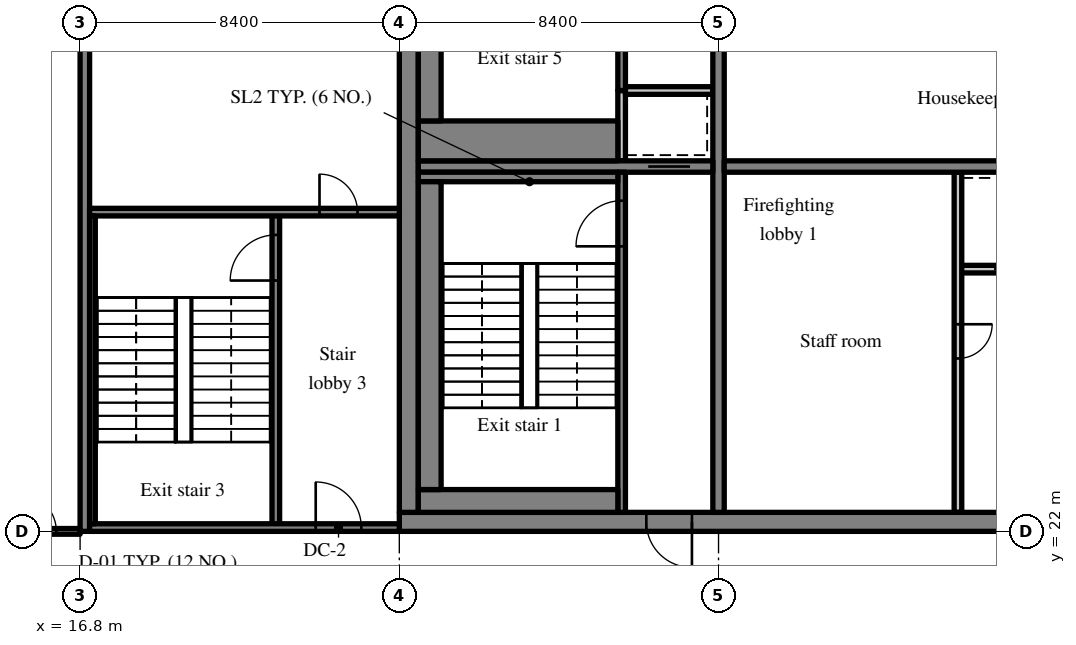
"""IFC4 building model, lengths in metres.
Left out: names, types, materials, properties, quantities, classifications, styles, units other than length and angle.
Written with IfcOpenShell. Run it as: python <this file> out.ifc"""

import sys

from ifc_helpers import new_model, si_unit, direction, frame, frame_2d, origin, place, context, subcontext, project, spatial, rectangle, extrude, source, transform, mapped, element, fill, save


model = new_model("IFC4")
c1 = context("Model", 3, precision=1e-05, world=origin(), true_north=direction((0.0, 1.0)))
c2 = subcontext(c1, "Body", "Model", "MODEL_VIEW")
j1 = project(units=[si_unit("LENGTHUNIT", "METRE"), si_unit("PLANEANGLEUNIT", "RADIAN")], contexts=[c1])
p1 = place(None, origin())
s1 = spatial("IfcSite", under=j1, at=p1, CompositionType="ELEMENT")
p2 = place(p1, origin())
s2 = spatial("IfcBuilding", under=s1, at=p2, CompositionType="ELEMENT")
p3 = place(p2, frame((0.0, 0.0, 277.7)))
s3 = spatial("IfcBuildingStorey", under=s2, at=p3, CompositionType="ELEMENT", Elevation=277.7)
m1 = source(origin(), c2, "Body", "SweptSolid", [
    extrude(rectangle(XDim=50.4, YDim=0.5, at=frame_2d((25.2, 0.0))), origin(), (0.0, 0.0, 1.0), 3.72),
])
p4 = place(p3, frame((25.2, 22.25, 0.0), z_axis=(0.0, 0.0, 1.0), x_axis=(1.0, 0.0, 0.0)))
e1 = element("IfcWall", 1, at=p4, inside=s3, PredefinedType="SHEAR", context=c2, shape_type="MappedRepresentation", body=[
    mapped(m1, transform((0.0, 0.0, 0.0), scale=1.0)),
])
m2 = source(origin(), c2, "Body", "SweptSolid", [
    extrude(rectangle(XDim=1.8, YDim=2.1, at=frame_2d((0.9, 1.05))), frame((0.0, 0.26, 0.0), z_axis=(0.0, -1.0, 0.0), x_axis=(1.0, 0.0, 0.0)), (0.0, 0.0, 1.0), 0.52),
])
p5 = place(p4, frame((15.9, 0.0, 0.0)))
e2 = element("IfcOpeningElement", 2, at=p5, cuts=e1, PredefinedType="OPENING", context=c2, shape_type="MappedRepresentation", body=[
    mapped(m2, transform((0.0, 0.0, 0.0), scale=1.0)),
])
m3 = source(origin(), c2, "Body", "SweptSolid", [
    extrude(rectangle(XDim=0.9, YDim=2.1, at=frame_2d((0.45, 1.05))), frame((0.0, 0.26, 0.0), z_axis=(0.0, -1.0, 0.0), x_axis=(1.0, 0.0, 0.0)), (0.0, 0.0, 1.0), 0.52),
])
p6 = place(p4, frame((21.525, 0.0, 0.0)))
e3 = element("IfcOpeningElement", 3, at=p6, cuts=e1, PredefinedType="OPENING", context=c2, shape_type="MappedRepresentation", body=[
    mapped(m3, transform((0.0, 0.0, 0.0), scale=1.0)),
])
p7 = place(p4, frame((32.7, 0.0, 0.0)))
e4 = element("IfcOpeningElement", 4, at=p7, cuts=e1, PredefinedType="OPENING", context=c2, shape_type="MappedRepresentation", body=[
    mapped(m2, transform((0.0, 0.0, 0.0), scale=1.0)),
])
m4 = source(origin(), c2, "Body", "SweptSolid", [
    extrude(rectangle(XDim=1.2, YDim=2.1, at=frame_2d((0.6, 1.05))), frame((0.0, 0.26, 0.0), z_axis=(0.0, -1.0, 0.0), x_axis=(1.0, 0.0, 0.0)), (0.0, 0.0, 1.0), 0.52),
])
p8 = place(p4, frame((6.5, 0.0, 0.0)))
e5 = element("IfcOpeningElement", 5, at=p8, cuts=e1, PredefinedType="OPENING", context=c2, shape_type="MappedRepresentation", body=[
    mapped(m4, transform((0.0, 0.0, 0.0), scale=1.0)),
])
p9 = place(p4, frame((47.975, 0.0, 0.0)))
e6 = element("IfcOpeningElement", 6, at=p9, cuts=e1, PredefinedType="OPENING", context=c2, shape_type="MappedRepresentation", body=[
    mapped(m4, transform((0.0, 0.0, 0.0), scale=1.0)),
])
m5 = source(origin(), c2, "Body", "SweptSolid", [
    extrude(rectangle(XDim=19.0, YDim=0.5, at=frame_2d((9.5, 0.0))), origin(), (0.0, 0.0, 1.0), 3.72),
])
p10 = place(p3, frame((25.45, 22.5, 0.0), z_axis=(0.0, 0.0, 1.0), x_axis=(0.0, 1.0, 0.0)))
e7 = element("IfcWall", 7, at=p10, inside=s3, PredefinedType="SHEAR", context=c2, shape_type="MappedRepresentation", body=[
    mapped(m5, transform((0.0, 0.0, 0.0), scale=1.0)),
])
m6 = source(origin(), c2, "Body", "SweptSolid", [
    extrude(rectangle(XDim=19.0, YDim=0.3, at=frame_2d((9.5, 0.0))), origin(), (0.0, 0.0, 1.0), 3.72),
])
p11 = place(p3, frame((33.6, 22.5, 0.0), z_axis=(0.0, 0.0, 1.0), x_axis=(0.0, 1.0, 0.0)))
e8 = element("IfcWall", 8, at=p11, inside=s3, PredefinedType="SHEAR", context=c2, shape_type="MappedRepresentation", body=[
    mapped(m6, transform((0.0, 0.0, 0.0), scale=1.0)),
])
m7 = source(origin(), c2, "Body", "SweptSolid", [
    extrude(rectangle(XDim=1.1, YDim=2.1, at=frame_2d((0.55, 1.05))), frame((0.0, 0.16, 0.0), z_axis=(0.0, -1.0, 0.0), x_axis=(1.0, 0.0, 0.0)), (0.0, 0.0, 1.0), 0.32),
])
p12 = place(p11, frame((12.95, 0.0, 0.0)))
e9 = element("IfcOpeningElement", 9, at=p12, cuts=e8, PredefinedType="OPENING", context=c2, shape_type="MappedRepresentation", body=[
    mapped(m7, transform((0.0, 0.0, 0.0), scale=1.0)),
])
m8 = source(origin(), c2, "Body", "SweptSolid", [
    extrude(rectangle(XDim=7.75, YDim=0.3, at=frame_2d((3.875, 0.0))), origin(), (0.0, 0.0, 1.0), 3.72),
])
p13 = place(p3, frame((25.7, 31.6, 0.0), z_axis=(0.0, 0.0, 1.0), x_axis=(1.0, 0.0, 0.0)))
e10 = element("IfcWall", 10, at=p13, inside=s3, PredefinedType="SHEAR", context=c2, shape_type="MappedRepresentation", body=[
    mapped(m8, transform((0.0, 0.0, 0.0), scale=1.0)),
])
p14 = place(p13, frame((6.05, 0.0, 0.0)))
e11 = element("IfcOpeningElement", 11, at=p14, cuts=e10, PredefinedType="OPENING", context=c2, shape_type="MappedRepresentation", body=[
    mapped(m7, transform((0.0, 0.0, 0.0), scale=1.0)),
])
m9 = source(origin(), c2, "Body", "SweptSolid", [
    extrude(rectangle(XDim=16.5, YDim=0.3, at=frame_2d((8.25, 0.0))), origin(), (0.0, 0.0, 1.0), 3.72),
])
p15 = place(p3, frame((33.75, 31.6, 0.0), z_axis=(0.0, 0.0, 1.0), x_axis=(1.0, 0.0, 0.0)))
e12 = element("IfcWall", 12, at=p15, inside=s3, PredefinedType="SHEAR", context=c2, shape_type="MappedRepresentation", body=[
    mapped(m9, transform((0.0, 0.0, 0.0), scale=1.0)),
])
m10 = source(origin(), c2, "Body", "SweptSolid", [
    extrude(rectangle(XDim=1.0, YDim=2.1, at=frame_2d((0.5, 1.05))), frame((0.0, 0.16, 0.0), z_axis=(0.0, -1.0, 0.0), x_axis=(1.0, 0.0, 0.0)), (0.0, 0.0, 1.0), 0.32),
])
p16 = place(p15, frame((14.875, 0.0, 0.0)))
e13 = element("IfcOpeningElement", 13, at=p16, cuts=e12, PredefinedType="OPENING", context=c2, shape_type="MappedRepresentation", body=[
    mapped(m10, transform((0.0, 0.0, 0.0), scale=1.0)),
])
m11 = source(origin(), c2, "Body", "SweptSolid", [
    extrude(rectangle(XDim=18.4, YDim=0.25, at=frame_2d((9.2, 0.0))), origin(), (0.0, 0.0, 1.0), 3.72),
])
p17 = place(p3, frame((16.925, 22.0, 0.0), z_axis=(0.0, 0.0, 1.0), x_axis=(0.0, 1.0, 0.0)))
e14 = element("IfcWall", 14, at=p17, inside=s3, PredefinedType="SHEAR", context=c2, shape_type="MappedRepresentation", body=[
    mapped(m11, transform((0.0, 0.0, 0.0), scale=1.0)),
])
m12 = source(origin(), c2, "Body", "SweptSolid", [
    extrude(rectangle(XDim=6.0, YDim=0.2, at=frame_2d((3.0, 0.0))), origin(), (0.0, 0.0, 1.0), 3.72),
])
p18 = place(p3, frame((39.9, 28.9, 0.0), z_axis=(0.0, 0.0, 1.0), x_axis=(1.0, 0.0, 0.0)))
e15 = element("IfcWall", 15, at=p18, inside=s3, PredefinedType="SOLIDWALL", context=c2, shape_type="MappedRepresentation", body=[
    mapped(m12, transform((0.0, 0.0, 0.0), scale=1.0)),
])
m13 = source(origin(), c2, "Body", "SweptSolid", [
    extrude(rectangle(XDim=1.1, YDim=2.1, at=frame_2d((0.55, 1.05))), frame((0.0, 0.11, 0.0), z_axis=(0.0, -1.0, 0.0), x_axis=(1.0, 0.0, 0.0)), (0.0, 0.0, 1.0), 0.22),
])
p19 = place(p18, frame((0.95, 0.0, 0.0)))
e16 = element("IfcOpeningElement", 16, at=p19, cuts=e15, PredefinedType="OPENING", context=c2, shape_type="MappedRepresentation", body=[
    mapped(m13, transform((0.0, 0.0, 0.0), scale=1.0)),
])
p20 = place(p18, frame((3.95, 0.0, 0.0)))
e17 = element("IfcOpeningElement", 17, at=p20, cuts=e15, PredefinedType="OPENING", context=c2, shape_type="MappedRepresentation", body=[
    mapped(m13, transform((0.0, 0.0, 0.0), scale=1.0)),
])
m14 = source(origin(), c2, "Body", "SweptSolid", [
    extrude(rectangle(XDim=8.95, YDim=0.2, at=frame_2d((4.475, 0.0))), origin(), (0.0, 0.0, 1.0), 3.72),
])
p21 = place(p3, frame((39.9, 22.5, 0.0), z_axis=(0.0, 0.0, 1.0), x_axis=(0.0, 1.0, 0.0)))
e18 = element("IfcWall", 18, at=p21, inside=s3, PredefinedType="PARTITIONING", context=c2, shape_type="MappedRepresentation", body=[
    mapped(m14, transform((0.0, 0.0, 0.0), scale=1.0)),
])
m15 = source(origin(), c2, "Body", "SweptSolid", [
    extrude(rectangle(XDim=0.9, YDim=2.1, at=frame_2d((0.45, 1.05))), frame((0.0, 0.11, 0.0), z_axis=(0.0, -1.0, 0.0), x_axis=(1.0, 0.0, 0.0)), (0.0, 0.0, 1.0), 0.22),
])
p22 = place(p21, frame((4.05, 0.0, 0.0)))
e19 = element("IfcOpeningElement", 19, at=p22, cuts=e18, PredefinedType="OPENING", context=c2, shape_type="MappedRepresentation", body=[
    mapped(m15, transform((0.0, 0.0, 0.0), scale=1.0)),
])
m16 = source(origin(), c2, "Body", "SweptSolid", [
    extrude(rectangle(XDim=8.95, YDim=0.2, at=frame_2d((4.475, 0.0))), origin(), (0.0, 0.0, 1.0), 3.72),
])
p23 = place(p3, frame((31.05, 22.5, 0.0), z_axis=(0.0, 0.0, 1.0), x_axis=(0.0, 1.0, 0.0)))
e20 = element("IfcWall", 20, at=p23, inside=s3, PredefinedType="SOLIDWALL", context=c2, shape_type="MappedRepresentation", body=[
    mapped(m16, transform((0.0, 0.0, 0.0), scale=1.0)),
])
m17 = source(origin(), c2, "Body", "SweptSolid", [
    extrude(rectangle(XDim=1.2, YDim=2.1, at=frame_2d((0.6, 1.05))), frame((0.0, 0.11, 0.0), z_axis=(0.0, -1.0, 0.0), x_axis=(1.0, 0.0, 0.0)), (0.0, 0.0, 1.0), 0.22),
])
p24 = place(p23, frame((7.0, 0.0, 0.0)))
e21 = element("IfcOpeningElement", 21, at=p24, cuts=e20, PredefinedType="OPENING", context=c2, shape_type="MappedRepresentation", body=[
    mapped(m17, transform((0.0, 0.0, 0.0), scale=1.0)),
])
m18 = source(origin(), c2, "Body", "SweptSolid", [
    extrude(rectangle(XDim=1.85, YDim=0.2, at=frame_2d((0.925, 0.0))), origin(), (0.0, 0.0, 1.0), 3.72),
])
p25 = place(p3, frame((31.05, 31.75, 0.0), z_axis=(0.0, 0.0, 1.0), x_axis=(0.0, 1.0, 0.0)))
e22 = element("IfcWall", 22, at=p25, inside=s3, PredefinedType="SOLIDWALL", context=c2, shape_type="MappedRepresentation", body=[
    mapped(m18, transform((0.0, 0.0, 0.0), scale=1.0)),
])
m19 = source(origin(), c2, "Body", "SweptSolid", [
    extrude(rectangle(XDim=2.3, YDim=0.2, at=frame_2d((1.15, 0.0))), origin(), (0.0, 0.0, 1.0), 3.72),
])
p26 = place(p3, frame((31.15, 33.6, 0.0), z_axis=(0.0, 0.0, 1.0), x_axis=(1.0, 0.0, 0.0)))
e23 = element("IfcWall", 23, at=p26, inside=s3, PredefinedType="SOLIDWALL", context=c2, shape_type="MappedRepresentation", body=[
    mapped(m19, transform((0.0, 0.0, 0.0), scale=1.0)),
])
m20 = source(origin(), c2, "Body", "SweptSolid", [
    extrude(rectangle(XDim=7.9, YDim=0.2, at=frame_2d((3.95, 0.0))), origin(), (0.0, 0.0, 1.0), 3.72),
])
p27 = place(p3, frame((31.05, 33.6, 0.0), z_axis=(0.0, 0.0, 1.0), x_axis=(0.0, 1.0, 0.0)))
e24 = element("IfcWall", 24, at=p27, inside=s3, PredefinedType="SOLIDWALL", context=c2, shape_type="MappedRepresentation", body=[
    mapped(m20, transform((0.0, 0.0, 0.0), scale=1.0)),
])
m21 = source(origin(), c2, "Body", "SweptSolid", [
    extrude(rectangle(XDim=1.8, YDim=2.1, at=frame_2d((0.9, 1.05))), frame((0.0, 0.11, 0.0), z_axis=(0.0, -1.0, 0.0), x_axis=(1.0, 0.0, 0.0)), (0.0, 0.0, 1.0), 0.22),
])
p28 = place(p27, frame((5.3, 0.0, 0.0)))
e25 = element("IfcOpeningElement", 25, at=p28, cuts=e24, PredefinedType="OPENING", context=c2, shape_type="MappedRepresentation", body=[
    mapped(m21, transform((0.0, 0.0, 0.0), scale=1.0)),
])
m22 = source(origin(), c2, "Body", "SweptSolid", [
    extrude(rectangle(XDim=8.3, YDim=0.2, at=frame_2d((4.15, 0.0))), origin(), (0.0, 0.0, 1.0), 3.72),
])
p29 = place(p3, frame((21.95, 22.1, 0.0), z_axis=(0.0, 0.0, 1.0), x_axis=(0.0, 1.0, 0.0)))
e26 = element("IfcWall", 26, at=p29, inside=s3, PredefinedType="SOLIDWALL", context=c2, shape_type="MappedRepresentation", body=[
    mapped(m22, transform((0.0, 0.0, 0.0), scale=1.0)),
])
p30 = place(p29, frame((6.5, 0.0, 0.0)))
e27 = element("IfcOpeningElement", 27, at=p30, cuts=e26, PredefinedType="OPENING", context=c2, shape_type="MappedRepresentation", body=[
    mapped(m17, transform((0.0, 0.0, 0.0), scale=1.0)),
])
m23 = source(origin(), c2, "Body", "SweptSolid", [
    extrude(rectangle(XDim=8.15, YDim=0.2, at=frame_2d((4.075, 0.0))), origin(), (0.0, 0.0, 1.0), 3.72),
])
p31 = place(p3, frame((17.05, 22.1, 0.0), z_axis=(0.0, 0.0, 1.0), x_axis=(1.0, 0.0, 0.0)))
e28 = element("IfcWall", 28, at=p31, inside=s3, PredefinedType="SOLIDWALL", context=c2, shape_type="MappedRepresentation", body=[
    mapped(m23, transform((0.0, 0.0, 0.0), scale=1.0)),
])
p32 = place(p31, frame((5.95, 0.0, 0.0)))
e29 = element("IfcOpeningElement", 29, at=p32, cuts=e28, PredefinedType="OPENING", context=c2, shape_type="MappedRepresentation", body=[
    mapped(m17, transform((0.0, 0.0, 0.0), scale=1.0)),
])
p33 = place(p3, frame((17.05, 30.4, 0.0), z_axis=(0.0, 0.0, 1.0), x_axis=(1.0, 0.0, 0.0)))
e30 = element("IfcWall", 30, at=p33, inside=s3, PredefinedType="SOLIDWALL", context=c2, shape_type="MappedRepresentation", body=[
    mapped(m23, transform((0.0, 0.0, 0.0), scale=1.0)),
])
m24 = source(origin(), c2, "Body", "SweptSolid", [
    extrude(rectangle(XDim=1.0, YDim=2.1, at=frame_2d((0.5, 1.05))), frame((0.0, 0.11, 0.0), z_axis=(0.0, -1.0, 0.0), x_axis=(1.0, 0.0, 0.0)), (0.0, 0.0, 1.0), 0.22),
])
p34 = place(p33, frame((6.05, 0.0, 0.0)))
e31 = element("IfcOpeningElement", 31, at=p34, cuts=e30, PredefinedType="OPENING", context=c2, shape_type="MappedRepresentation", body=[
    mapped(m24, transform((0.0, 0.0, 0.0), scale=1.0)),
])
m25 = source(origin(), c2, "Body", "SweptSolid", [
    extrude(rectangle(XDim=5.25, YDim=0.6, at=frame_2d((2.625, 0.0))), origin(), (0.0, 0.0, 1.0), 3.72),
])
p35 = place(p3, frame((25.7, 22.8, 0.0), z_axis=(0.0, 0.0, 1.0), x_axis=(1.0, 0.0, 0.0)))
e32 = element("IfcWall", 32, at=p35, inside=s3, PredefinedType="SOLIDWALL", context=c2, shape_type="MappedRepresentation", body=[
    mapped(m25, transform((0.0, 0.0, 0.0), scale=1.0)),
])
m26 = source(origin(), c2, "Body", "SweptSolid", [
    extrude(rectangle(XDim=5.25, YDim=0.25, at=frame_2d((2.625, 0.0))), origin(), (0.0, 0.0, 1.0), 3.72),
])
p36 = place(p3, frame((25.7, 31.325, 0.0), z_axis=(0.0, 0.0, 1.0), x_axis=(1.0, 0.0, 0.0)))
e33 = element("IfcWall", 33, at=p36, inside=s3, PredefinedType="SOLIDWALL", context=c2, shape_type="MappedRepresentation", body=[
    mapped(m26, transform((0.0, 0.0, 0.0), scale=1.0)),
])
m27 = source(origin(), c2, "Body", "SweptSolid", [
    extrude(rectangle(XDim=8.1, YDim=0.6, at=frame_2d((4.05, 0.0))), origin(), (0.0, 0.0, 1.0), 3.72),
])
p37 = place(p3, frame((26.0, 23.1, 0.0), z_axis=(0.0, 0.0, 1.0), x_axis=(0.0, 1.0, 0.0)))
e34 = element("IfcWall", 34, at=p37, inside=s3, PredefinedType="SOLIDWALL", context=c2, shape_type="MappedRepresentation", body=[
    mapped(m27, transform((0.0, 0.0, 0.0), scale=1.0)),
])
m28 = source(origin(), c2, "Body", "SweptSolid", [
    extrude(rectangle(XDim=8.1, YDim=0.15, at=frame_2d((4.05, 0.0))), origin(), (0.0, 0.0, 1.0), 3.72),
])
p38 = place(p3, frame((17.125, 22.2, 0.0), z_axis=(0.0, 0.0, 1.0), x_axis=(0.0, 1.0, 0.0)))
e35 = element("IfcWall", 35, at=p38, inside=s3, PredefinedType="SOLIDWALL", context=c2, shape_type="MappedRepresentation", body=[
    mapped(m28, transform((0.0, 0.0, 0.0), scale=1.0)),
])
m29 = source(origin(), c2, "Body", "SweptSolid", [
    extrude(rectangle(XDim=5.25, YDim=1.05, at=frame_2d((2.625, 0.0))), origin(), (0.0, 0.0, 1.0), 3.72),
])
p39 = place(p3, frame((25.7, 32.275, 0.0), z_axis=(0.0, 0.0, 1.0), x_axis=(1.0, 0.0, 0.0)))
e36 = element("IfcWall", 36, at=p39, inside=s3, PredefinedType="SOLIDWALL", context=c2, shape_type="MappedRepresentation", body=[
    mapped(m29, transform((0.0, 0.0, 0.0), scale=1.0)),
])
p40 = place(p3, frame((26.0, 32.8, 0.0), z_axis=(0.0, 0.0, 1.0), x_axis=(0.0, 1.0, 0.0)))
e37 = element("IfcWall", 37, at=p40, inside=s3, PredefinedType="SOLIDWALL", context=c2, shape_type="MappedRepresentation", body=[
    mapped(m27, transform((0.0, 0.0, 0.0), scale=1.0)),
])
m30 = source(origin(), c2, "Body", "SweptSolid", [
    extrude(rectangle(XDim=1.9, YDim=0.15, at=frame_2d((0.95, 0.0))), origin(), (0.0, 0.0, 1.0), 3.02),
])
p41 = place(p3, frame((14.9, 22.0, 0.0), z_axis=(0.0, 0.0, 1.0), x_axis=(1.0, 0.0, 0.0)))
e38 = element("IfcWall", 38, at=p41, inside=s3, PredefinedType="PARTITIONING", context=c2, shape_type="MappedRepresentation", body=[
    mapped(m30, transform((0.0, 0.0, 0.0), scale=1.0)),
])
m31 = source(origin(), c2, "Body", "SweptSolid", [
    extrude(rectangle(XDim=1.0, YDim=2.1, at=frame_2d((0.5, 1.05))), frame((0.0, 0.085, 0.0), z_axis=(0.0, -1.0, 0.0), x_axis=(1.0, 0.0, 0.0)), (0.0, 0.0, 1.0), 0.17),
])
p42 = place(p41, frame((0.275, 0.0, 0.0)))
e39 = element("IfcOpeningElement", 39, at=p42, cuts=e38, PredefinedType="OPENING", context=c2, shape_type="MappedRepresentation", body=[
    mapped(m31, transform((0.0, 0.0, 0.0), scale=1.0)),
])
m32 = source(origin(), c2, "Body", "SweptSolid", [
    extrude(rectangle(XDim=1.1, YDim=2.1, at=frame_2d((0.55, 1.05))), frame((0.0, 0.025, 0.0), z_axis=(0.0, -1.0, 0.0), x_axis=(1.0, 0.0, 0.0)), (0.0, 0.0, 1.0), 0.05),
])
p43 = place(p19, origin())
e40 = element("IfcDoor", 40, at=p43, inside=s3, OperationType="SLIDING_TO_LEFT", PredefinedType="DOOR", context=c2, shape_type="MappedRepresentation", body=[
    mapped(m32, transform((0.0, 0.0, 0.0), scale=1.0)),
])
fill(e16, e40)
m33 = source(origin(), c2, "Body", "SweptSolid", [
    extrude(rectangle(XDim=0.9, YDim=2.1, at=frame_2d((0.45, 1.05))), frame((0.0, 0.025, 0.0), z_axis=(0.0, -1.0, 0.0), x_axis=(1.0, 0.0, 0.0)), (0.0, 0.0, 1.0), 0.05),
])
p44 = place(p22, origin())
e41 = element("IfcDoor", 41, at=p44, inside=s3, OperationType="SINGLE_SWING_RIGHT", PredefinedType="DOOR", context=c2, shape_type="MappedRepresentation", body=[
    mapped(m33, transform((0.0, 0.0, 0.0), scale=1.0)),
])
fill(e19, e41)
m34 = source(origin(), c2, "Body", "SweptSolid", [
    extrude(rectangle(XDim=1.2, YDim=2.1, at=frame_2d((0.6, 1.05))), frame((0.0, 0.025, 0.0), z_axis=(0.0, -1.0, 0.0), x_axis=(1.0, 0.0, 0.0)), (0.0, 0.0, 1.0), 0.05),
])
p45 = place(p24, origin())
e42 = element("IfcDoor", 42, at=p45, inside=s3, OperationType="SINGLE_SWING_LEFT", PredefinedType="DOOR", context=c2, shape_type="MappedRepresentation", body=[
    mapped(m34, transform((0.0, 0.0, 0.0), scale=1.0)),
])
fill(e21, e42)
m35 = source(origin(), c2, "Body", "SweptSolid", [
    extrude(rectangle(XDim=1.2, YDim=2.1, at=frame_2d((0.6, 1.05))), frame((0.0, 0.175, 0.0), z_axis=(0.0, -1.0, 0.0), x_axis=(1.0, 0.0, 0.0)), (0.0, 0.0, 1.0), 0.05),
])
p46 = place(p8, origin())
e43 = element("IfcDoor", 43, at=p46, inside=s3, OperationType="SINGLE_SWING_RIGHT", PredefinedType="DOOR", context=c2, shape_type="MappedRepresentation", body=[
    mapped(m35, transform((0.0, 0.0, 0.0), scale=1.0)),
])
fill(e5, e43)
p47 = place(p14, origin())
e44 = element("IfcDoor", 44, at=p47, inside=s3, OperationType="SLIDING_TO_RIGHT", PredefinedType="DOOR", context=c2, shape_type="MappedRepresentation", body=[
    mapped(m32, transform((0.0, 0.0, 0.0), scale=1.0)),
])
fill(e11, e44)
p48 = place(p30, origin())
e45 = element("IfcDoor", 45, at=p48, inside=s3, OperationType="SINGLE_SWING_LEFT", PredefinedType="DOOR", context=c2, shape_type="MappedRepresentation", body=[
    mapped(m34, transform((0.0, 0.0, 0.0), scale=1.0)),
])
fill(e27, e45)
p49 = place(p32, origin())
e46 = element("IfcDoor", 46, at=p49, inside=s3, OperationType="SINGLE_SWING_LEFT", PredefinedType="DOOR", context=c2, shape_type="MappedRepresentation", body=[
    mapped(m34, transform((0.0, 0.0, 0.0), scale=1.0)),
])
fill(e29, e46)
m36 = source(origin(), c2, "Body", "SweptSolid", [
    extrude(rectangle(XDim=1.0, YDim=2.1, at=frame_2d((0.5, 1.05))), frame((0.0, 0.025, 0.0), z_axis=(0.0, -1.0, 0.0), x_axis=(1.0, 0.0, 0.0)), (0.0, 0.0, 1.0), 0.05),
])
p50 = place(p34, origin())
e47 = element("IfcDoor", 47, at=p50, inside=s3, OperationType="SINGLE_SWING_LEFT", PredefinedType="DOOR", context=c2, shape_type="MappedRepresentation", body=[
    mapped(m36, transform((0.0, 0.0, 0.0), scale=1.0)),
])
fill(e31, e47)
p51 = place(p42, origin())
e48 = element("IfcDoor", 48, at=p51, inside=s3, OperationType="SINGLE_SWING_LEFT", PredefinedType="DOOR", context=c2, shape_type="MappedRepresentation", body=[
    mapped(m36, transform((0.0, 0.0, 0.0), scale=1.0)),
])
fill(e39, e48)
save(model, sys.argv[1])
